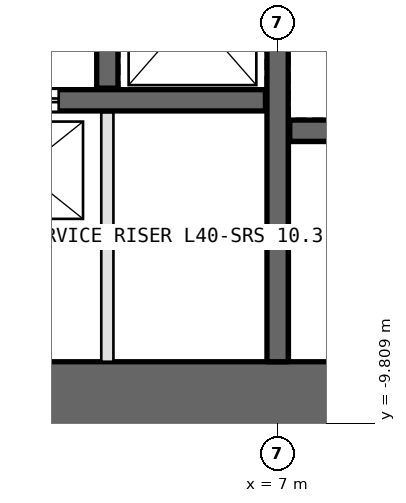
"""IFC4 building model, lengths in metres.
Left out: names, types, materials, properties, quantities, classifications, styles, units other than length and angle.
Written with IfcOpenShell. Run it as: python <this file> out.ifc"""

import sys

from ifc_helpers import new_model, si_unit, direction, frame, frame_2d, origin, place, context, subcontext, project, spatial, rectangle, extrude, element, fill, save


model = new_model("IFC4")
c1 = context("Model", 3, precision=1e-05, world=origin(), true_north=direction((0.0, 1.0)))
c2 = subcontext(c1, "Body", "Model", "MODEL_VIEW")
j1 = project(units=[si_unit("LENGTHUNIT", "METRE"), si_unit("PLANEANGLEUNIT", "RADIAN")], contexts=[c1])
p1 = place(None, origin())
s1 = spatial("IfcSite", under=j1, at=p1, CompositionType="ELEMENT")
p2 = place(p1, origin())
s2 = spatial("IfcBuilding", under=s1, at=p2, CompositionType="ELEMENT")
p3 = place(p2, frame((0.0, 0.0, 184.8)))
s3 = spatial("IfcBuildingStorey", under=s2, at=p3, CompositionType="ELEMENT", Elevation=184.8)
p4 = place(p3, frame((-14.0, -9.4, 0.0), z_axis=(0.0, 0.0, 1.0), x_axis=(1.0, 0.0, 0.0)))
e1 = element("IfcWall", 1, at=p4, inside=s3, PredefinedType="SHEAR", context=c2, shape_type="SweptSolid", body=[
    extrude(rectangle(XDim=28.0, YDim=1.2, at=frame_2d((14.0, 0.0))), origin(), (0.0, 0.0, 1.0), 5.0),
])
p5 = place(p4, frame((22.9, 0.0, 0.0)))
e2 = element("IfcOpeningElement", 2, at=p5, cuts=e1, PredefinedType="OPENING", context=c2, shape_type="SweptSolid", body=[
    extrude(rectangle(XDim=2.2, YDim=2.7, at=frame_2d((1.1, 1.35))), frame((0.0, 0.61, 0.0), z_axis=(0.0, -1.0, 0.0), x_axis=(1.0, 0.0, 0.0)), (0.0, 0.0, 1.0), 1.22),
])
p6 = place(p3, frame((7.0, -8.8, 0.0), z_axis=(0.0, 0.0, 1.0), x_axis=(0.0, 1.0, 0.0)))
e3 = element("IfcWall", 3, at=p6, inside=s3, PredefinedType="SHEAR", context=c2, shape_type="SweptSolid", body=[
    extrude(rectangle(XDim=17.6, YDim=0.35, at=frame_2d((8.8, 0.0))), origin(), (0.0, 0.0, 1.0), 5.0),
])
p7 = place(p6, frame((7.9, 0.0, 0.0)))
e4 = element("IfcOpeningElement", 4, at=p7, cuts=e3, PredefinedType="OPENING", context=c2, shape_type="SweptSolid", body=[
    extrude(rectangle(XDim=1.8, YDim=2.4, at=frame_2d((0.9, 1.2))), frame((0.0, 0.185, 0.0), z_axis=(0.0, -1.0, 0.0), x_axis=(1.0, 0.0, 0.0)), (0.0, 0.0, 1.0), 0.37),
])
p8 = place(p3, frame((-6.8, -4.5, 0.0), z_axis=(0.0, 0.0, 1.0), x_axis=(1.0, 0.0, 0.0)))
e5 = element("IfcWall", 5, at=p8, inside=s3, PredefinedType="SHEAR", context=c2, shape_type="SweptSolid", body=[
    extrude(rectangle(XDim=13.6, YDim=0.35, at=frame_2d((6.8, 0.0))), origin(), (0.0, 0.0, 1.0), 5.0),
])
p9 = place(p8, frame((0.7, 0.0, 0.0)))
e6 = element("IfcOpeningElement", 6, at=p9, cuts=e5, PredefinedType="OPENING", context=c2, shape_type="SweptSolid", body=[
    extrude(rectangle(XDim=1.1, YDim=2.4, at=frame_2d((0.55, 1.2))), frame((0.0, 0.185, 0.0), z_axis=(0.0, -1.0, 0.0), x_axis=(1.0, 0.0, 0.0)), (0.0, 0.0, 1.0), 0.37),
])
p10 = place(p8, frame((3.5, 0.0, 0.0)))
e7 = element("IfcOpeningElement", 7, at=p10, cuts=e5, PredefinedType="OPENING", context=c2, shape_type="SweptSolid", body=[
    extrude(rectangle(XDim=1.1, YDim=2.4, at=frame_2d((0.55, 1.2))), frame((0.0, 0.185, 0.0), z_axis=(0.0, -1.0, 0.0), x_axis=(1.0, 0.0, 0.0)), (0.0, 0.0, 1.0), 0.37),
])
p11 = place(p8, frame((6.3, 0.0, 0.0)))
e8 = element("IfcOpeningElement", 8, at=p11, cuts=e5, PredefinedType="OPENING", context=c2, shape_type="SweptSolid", body=[
    extrude(rectangle(XDim=1.1, YDim=2.4, at=frame_2d((0.55, 1.2))), frame((0.0, 0.185, 0.0), z_axis=(0.0, -1.0, 0.0), x_axis=(1.0, 0.0, 0.0)), (0.0, 0.0, 1.0), 0.37),
])
p12 = place(p8, frame((9.1, 0.0, 0.0)))
e9 = element("IfcOpeningElement", 9, at=p12, cuts=e5, PredefinedType="OPENING", context=c2, shape_type="SweptSolid", body=[
    extrude(rectangle(XDim=1.1, YDim=2.4, at=frame_2d((0.55, 1.2))), frame((0.0, 0.185, 0.0), z_axis=(0.0, -1.0, 0.0), x_axis=(1.0, 0.0, 0.0)), (0.0, 0.0, 1.0), 0.37),
])
p13 = place(p3, frame((7.2, -5.0, 0.0), z_axis=(0.0, 0.0, 1.0), x_axis=(1.0, 0.0, 0.0)))
e10 = element("IfcWall", 10, at=p13, inside=s3, PredefinedType="SHEAR", context=c2, shape_type="SweptSolid", body=[
    extrude(rectangle(XDim=5.6, YDim=0.35, at=frame_2d((2.8, 0.0))), origin(), (0.0, 0.0, 1.0), 5.0),
])
p14 = place(p3, frame((4.2, -4.3, 0.0), z_axis=(0.0, 0.0, 1.0), x_axis=(0.0, 1.0, 0.0)))
e11 = element("IfcWall", 11, at=p14, inside=s3, PredefinedType="SHEAR", context=c2, shape_type="SweptSolid", body=[
    extrude(rectangle(XDim=2.5, YDim=0.35, at=frame_2d((1.25, 0.0))), origin(), (0.0, 0.0, 1.0), 5.0),
])
p15 = place(p3, frame((4.2, -4.7, 0.0), z_axis=(0.0, 0.0, 1.0), x_axis=(0.0, -1.0, 0.0)))
e12 = element("IfcWall", 12, at=p15, inside=s3, PredefinedType="PARTITIONING", context=c2, shape_type="SweptSolid", body=[
    extrude(rectangle(XDim=4.1, YDim=0.2, at=frame_2d((2.05, 0.0))), origin(), (0.0, 0.0, 1.0), 5.0),
])
p16 = place(p12, origin())
e13 = element("IfcDoor", 13, at=p16, inside=s3, OperationType="DOUBLE_DOOR_SLIDING", PredefinedType="DOOR", context=c2, shape_type="SweptSolid", body=[
    extrude(rectangle(XDim=1.1, YDim=2.4, at=frame_2d((0.55, 1.2))), frame((0.0, 0.025, 0.0), z_axis=(0.0, -1.0, 0.0), x_axis=(1.0, 0.0, 0.0)), (0.0, 0.0, 1.0), 0.05),
])
fill(e9, e13)
save(model, sys.argv[1])
